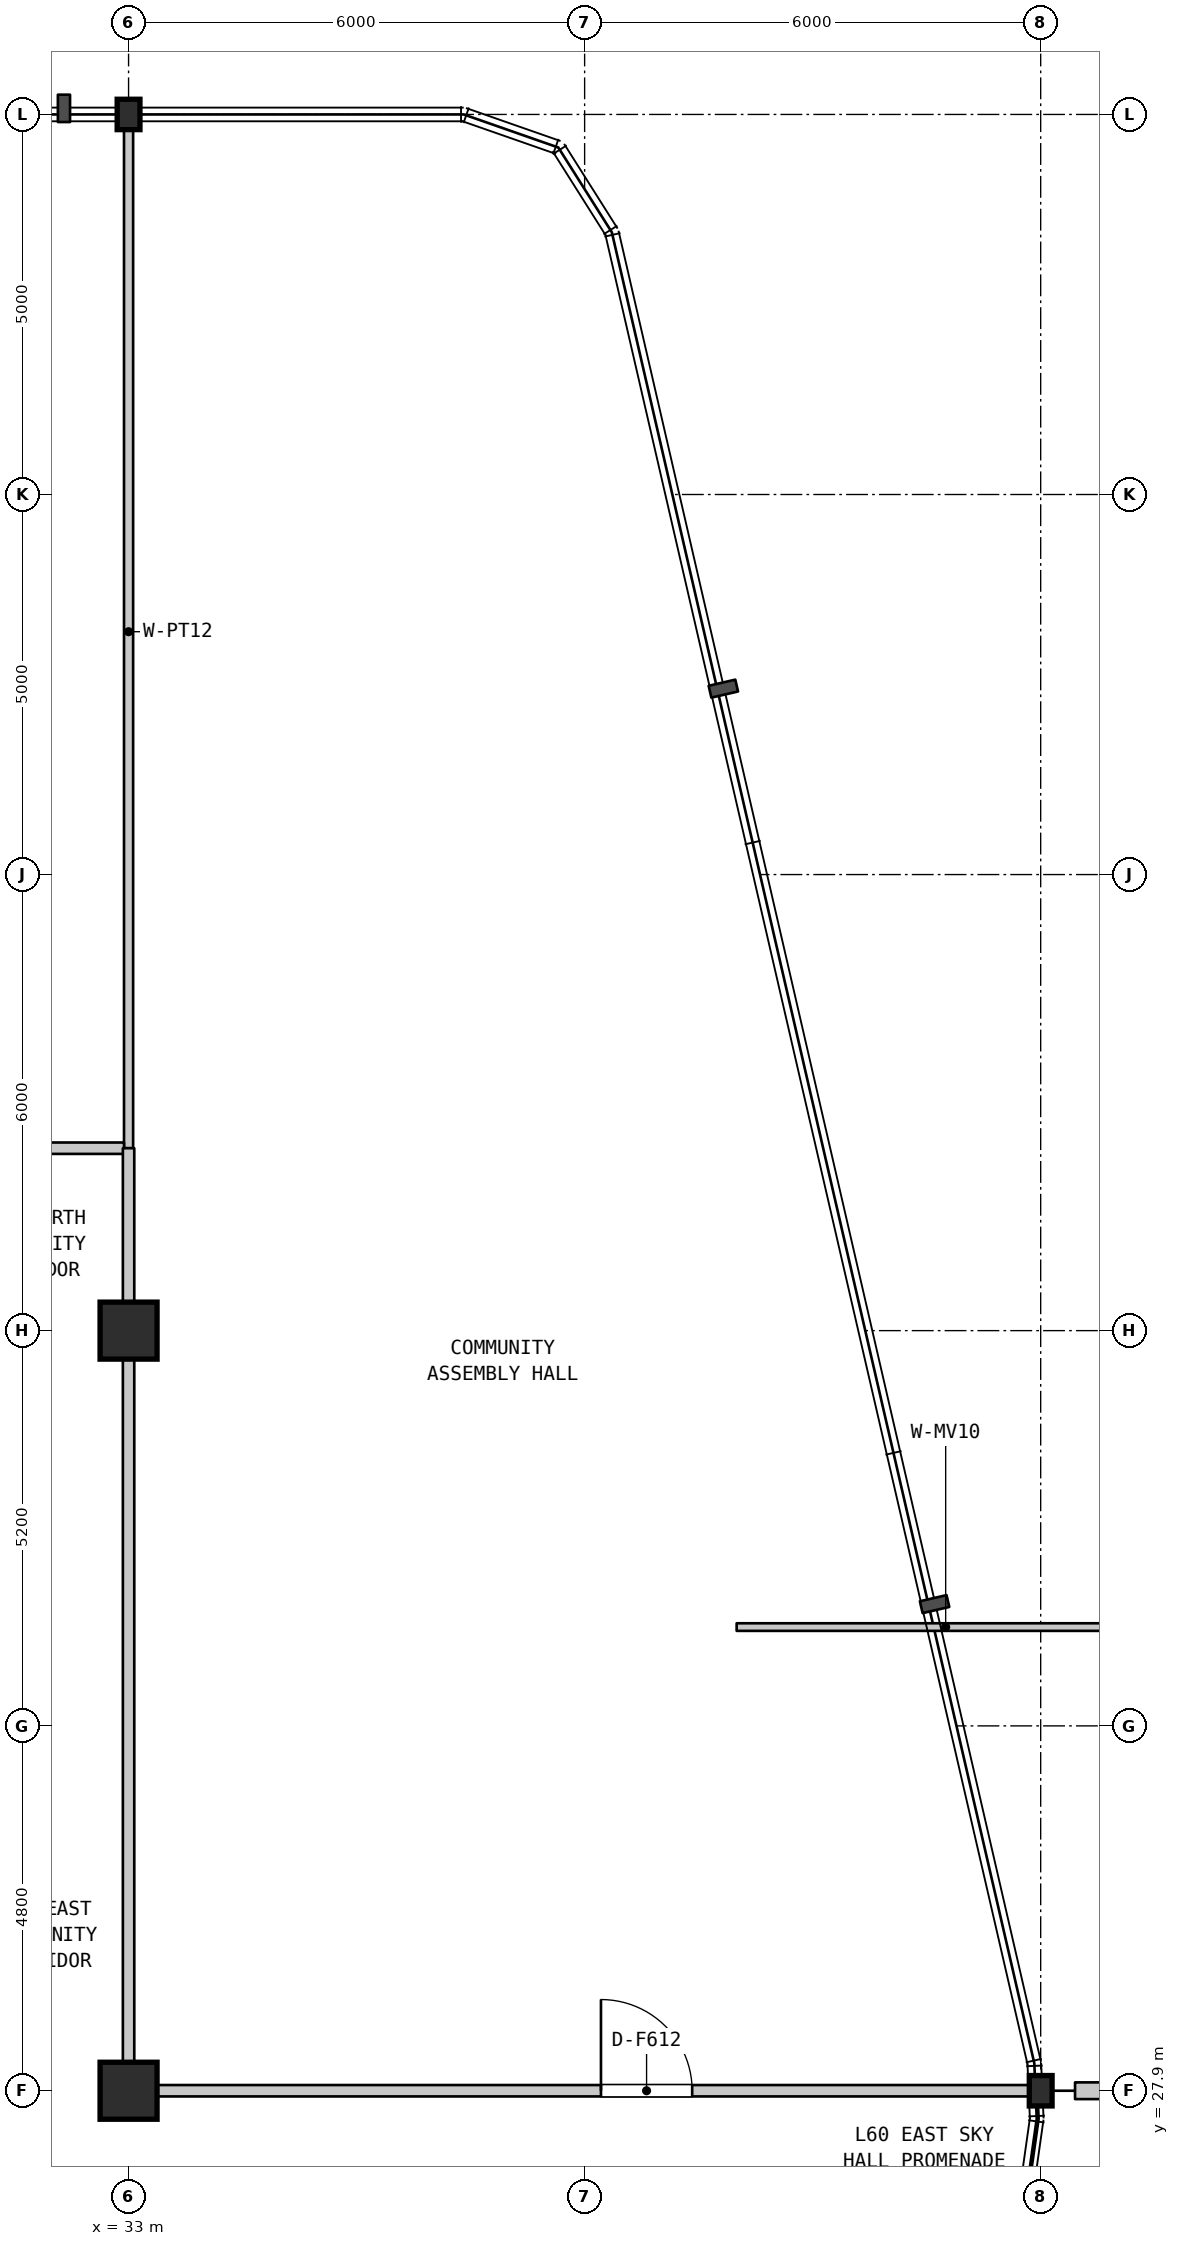
"""IFC4 building model, lengths in metres.
Left out: names, types, materials, properties, quantities, classifications, styles, units other than length and angle.
Written with IfcOpenShell. Run it as: python <this file> out.ifc"""

import sys

from ifc_helpers import new_model, si_unit, direction, frame, frame_2d, origin, origin_2d, place, context, subcontext, project, spatial, rectangle, i_section, extrude, element, fill, save


model = new_model("IFC4")
c1 = context("Model", 3, precision=1e-05, world=origin(), true_north=direction((0.0, 1.0)))
c2 = subcontext(c1, "Body", "Model", "MODEL_VIEW")
j1 = project(units=[si_unit("LENGTHUNIT", "METRE"), si_unit("PLANEANGLEUNIT", "RADIAN")], contexts=[c1])
p1 = place(None, origin())
s1 = spatial("IfcSite", under=j1, at=p1, CompositionType="ELEMENT")
p2 = place(p1, origin())
s2 = spatial("IfcBuilding", under=s1, at=p2, CompositionType="ELEMENT")
p3 = place(p2, frame((0.0, 0.0, 242.8)))
s3 = spatial("IfcBuildingStorey", under=s2, at=p3, CompositionType="ELEMENT", Elevation=242.8)
for number, where, z_axis, x_axis in (
    (1, (33.0, 27.9, 0.0), (0.0, 0.0, 1.0), (1.0, 0.0, 0.0)),
    (2, (33.0, 37.9, 0.0), (0.0, 0.0, 1.0), (1.0, 0.0, 0.0)),
):
    element("IfcColumn", number, at=place(p3, frame(where, z_axis=z_axis, x_axis=x_axis)), inside=s3, PredefinedType="COLUMN", context=c2, shape_type="SweptSolid", body=[
        extrude(rectangle(XDim=0.75, YDim=0.75, at=origin_2d()), origin(), (0.0, 0.0, 1.0), 4.5),
    ])
for number, where, z_axis, x_axis in (
    (3, (33.0, 53.9, 0.0), (0.0, 0.0, 1.0), (1.0, 0.0, 0.0)),
    (4, (45.0, 27.9, 0.0), (0.0, 0.0, 1.0), (1.0, 0.0, 0.0)),
):
    element("IfcColumn", number, at=place(p3, frame(where, z_axis=z_axis, x_axis=x_axis)), inside=s3, PredefinedType="COLUMN", context=c2, shape_type="SweptSolid", body=[
        extrude(i_section(OverallWidth=0.3, OverallDepth=0.4, WebThickness=0.013, FlangeThickness=0.024, FilletRadius=0.027, at=origin_2d()), origin(), (0.0, 0.0, 1.0), 4.5),
    ])
p4 = place(p3, frame((45.452, 27.9, 0.0), z_axis=(0.0, 0.0, 1.0), x_axis=(1.0, 0.0, 0.0)))
e5 = element("IfcWall", 5, at=p4, inside=s3, PredefinedType="PARAPET", context=c2, shape_type="SweptSolid", body=[
    extrude(rectangle(XDim=9.548, YDim=0.22, at=frame_2d((4.774, 0.0))), origin(), (0.0, 0.0, 1.0), 0.55),
])
p5 = place(p3, frame((33.0, 27.9, 0.0), z_axis=(0.0, 0.0, 1.0), x_axis=(0.0, 1.0, 0.0)))
e6 = element("IfcWall", 6, at=p5, inside=s3, PredefinedType="STANDARD", context=c2, shape_type="SweptSolid", body=[
    extrude(rectangle(XDim=10.0, YDim=0.15, at=frame_2d((5.0, 0.0))), origin(), (0.0, 0.0, 1.0), 3.69),
])
p6 = place(p3, frame((33.0, 40.3, 0.0), z_axis=(0.0, 0.0, 1.0), x_axis=(0.0, 1.0, 0.0)))
e7 = element("IfcWall", 7, at=p6, inside=s3, PredefinedType="PARTITIONING", context=c2, shape_type="SweptSolid", body=[
    extrude(rectangle(XDim=13.59, YDim=0.12, at=frame_2d((6.795, 0.0))), origin(), (0.0, 0.0, 1.0), 3.59),
])
p7 = place(p3, frame((33.06, 27.9, 0.0), z_axis=(0.0, 0.0, 1.0), x_axis=(1.0, 0.0, 0.0)))
e8 = element("IfcWall", 8, at=p7, inside=s3, PredefinedType="STANDARD", context=c2, shape_type="SweptSolid", body=[
    extrude(rectangle(XDim=11.862, YDim=0.15, at=frame_2d((5.931, 0.0))), origin(), (0.0, 0.0, 1.0), 3.69),
])
p8 = place(p7, frame((6.155, 0.0, 0.0)))
e9 = element("IfcOpeningElement", 9, at=p8, cuts=e8, PredefinedType="OPENING", context=c2, shape_type="SweptSolid", body=[
    extrude(rectangle(XDim=1.2, YDim=2.2, at=frame_2d((0.6, 1.1))), frame((0.0, 0.085, 0.0), z_axis=(0.0, -1.0, 0.0), x_axis=(1.0, 0.0, 0.0)), (0.0, 0.0, 1.0), 0.17),
])
p9 = place(p3, frame((15.045, 40.3, 0.0), z_axis=(0.0, 0.0, 1.0), x_axis=(1.0, 0.0, 0.0)))
e10 = element("IfcWall", 10, at=p9, inside=s3, PredefinedType="STANDARD", context=c2, shape_type="SweptSolid", body=[
    extrude(rectangle(XDim=17.895, YDim=0.15, at=frame_2d((8.948, 0.0))), origin(), (0.0, 0.0, 1.0), 4.19),
])
p10 = place(p9, frame((9.205, 0.0, 0.0)))
e11 = element("IfcOpeningElement", 11, at=p10, cuts=e10, PredefinedType="OPENING", context=c2, shape_type="SweptSolid", body=[
    extrude(rectangle(XDim=1.0, YDim=2.15, at=frame_2d((0.5, 1.075))), frame((0.0, 0.085, 0.0), z_axis=(0.0, -1.0, 0.0), x_axis=(1.0, 0.0, 0.0)), (0.0, 0.0, 1.0), 0.17),
])
p11 = place(p3, frame((41.0, 34.0, 0.0), z_axis=(0.0, 0.0, 1.0), x_axis=(1.0, 0.0, 0.0)))
e12 = element("IfcWall", 12, at=p11, inside=s3, PredefinedType="MOVABLE", context=c2, shape_type="SweptSolid", body=[
    extrude(rectangle(XDim=5.5, YDim=0.1, at=frame_2d((2.75, 0.0))), origin(), (0.0, 0.0, 1.0), 4.14),
])
p12 = place(p3, frame((33.0, 37.9, 0.0), z_axis=(0.0, 0.0, 1.0), x_axis=(0.0, 1.0, 0.0)))
e13 = element("IfcWall", 13, at=p12, inside=s3, PredefinedType="STANDARD", context=c2, shape_type="SweptSolid", body=[
    extrude(rectangle(XDim=2.4, YDim=0.15, at=frame_2d((1.2, 0.0))), origin(), (0.0, 0.0, 1.0), 3.59),
])
p13 = place(p8, origin())
e14 = element("IfcDoor", 14, at=p13, inside=s3, OperationType="SINGLE_SWING_LEFT", PredefinedType="DOOR", context=c2, shape_type="SweptSolid", body=[
    extrude(rectangle(XDim=1.2, YDim=2.2, at=frame_2d((0.6, 1.1))), frame((0.0, 0.025, 0.0), z_axis=(0.0, -1.0, 0.0), x_axis=(1.0, 0.0, 0.0)), (0.0, 0.0, 1.0), 0.05),
])
fill(e9, e14)
save(model, sys.argv[1])
